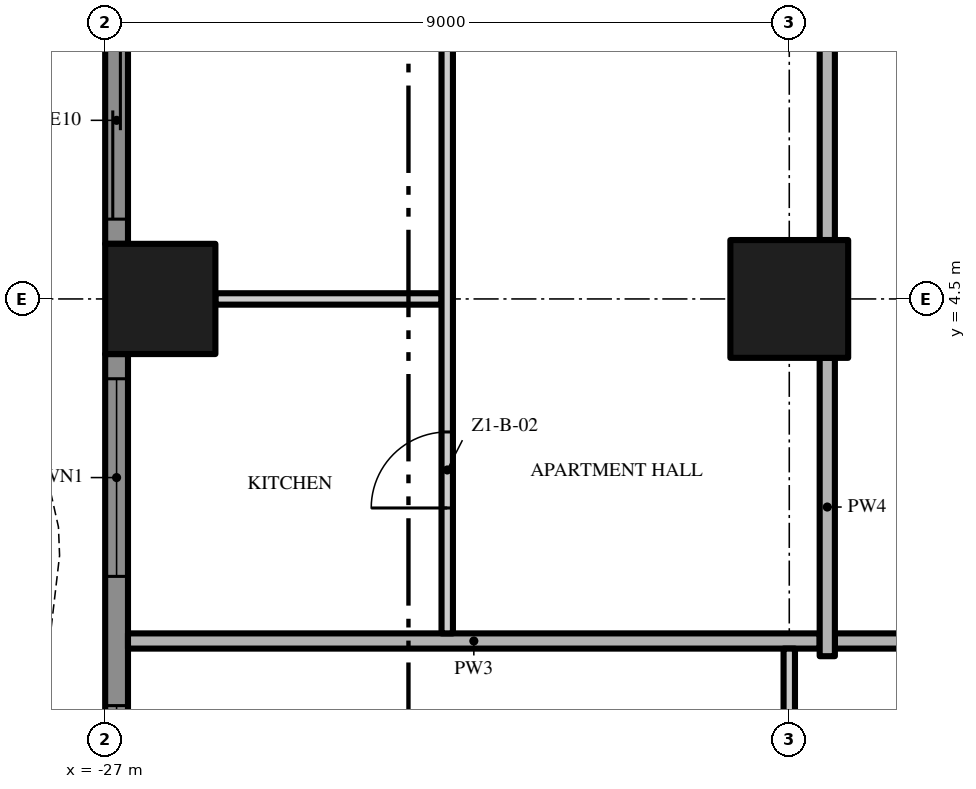
"""IFC4 building model, lengths in metres.
Left out: names, types, materials, properties, quantities, classifications, styles, units other than length and angle.
Written with IfcOpenShell. Run it as: python <this file> out.ifc"""

import sys

from ifc_helpers import new_model, si_unit, direction, frame, frame_2d, origin, origin_2d, place, context, subcontext, project, spatial, polyline, rectangle, outline, extrude, element, fill, save


model = new_model("IFC4")
c1 = context("Model", 3, precision=1e-05, world=origin(), true_north=direction((0.0, 1.0)))
c2 = subcontext(c1, "Body", "Model", "MODEL_VIEW")
j1 = project(units=[si_unit("LENGTHUNIT", "METRE"), si_unit("PLANEANGLEUNIT", "RADIAN")], contexts=[c1])
p1 = place(None, origin())
s1 = spatial("IfcSite", under=j1, at=p1, CompositionType="ELEMENT")
p2 = place(p1, origin())
s2 = spatial("IfcBuilding", under=s1, at=p2, CompositionType="ELEMENT")
p3 = place(p2, frame((0.0, 0.0, 34.0)))
s3 = spatial("IfcBuildingStorey", under=s2, at=p3, CompositionType="ELEMENT", Elevation=34.0)
p4 = place(p3, frame((-18.0, 4.5, 0.0), z_axis=(0.0, 0.0, 1.0), x_axis=(1.0, 0.0, 0.0)))
e1 = element("IfcColumn", 1, at=p4, inside=s3, PredefinedType="COLUMN", context=c2, shape_type="SweptSolid", body=[
    extrude(rectangle(XDim=1.55, YDim=1.55, at=origin_2d()), origin(), (0.0, 0.0, 1.0), 3.5),
])
p5 = place(p3, frame((-26.275, 4.5, 0.0), z_axis=(0.0, 0.0, 1.0), x_axis=(1.0, 0.0, 0.0)))
e2 = element("IfcColumn", 2, at=p5, inside=s3, PredefinedType="COLUMN", context=c2, shape_type="SweptSolid", body=[
    extrude(rectangle(XDim=1.45, YDim=1.45, at=origin_2d()), origin(), (0.0, 0.0, 1.0), 3.5),
])
p6 = place(p3, frame((-26.85, 5.225, 0.0), z_axis=(0.0, 0.0, 1.0), x_axis=(0.0, 1.0, 0.0)))
e3 = element("IfcWall", 3, at=p6, inside=s3, PredefinedType="SOLIDWALL", context=c2, shape_type="SweptSolid", body=[
    extrude(rectangle(XDim=7.55, YDim=0.3, at=frame_2d((3.775, 0.0))), origin(), (0.0, 0.0, 1.0), 3.5),
])
p7 = place(p6, frame((4.625, 0.0, 0.0)))
e4 = element("IfcOpeningElement", 4, at=p7, cuts=e3, PredefinedType="OPENING", context=c2, shape_type="SweptSolid", body=[
    extrude(rectangle(XDim=2.6, YDim=2.4, at=frame_2d((1.3, 1.2))), frame((0.0, 0.16, 0.0), z_axis=(0.0, -1.0, 0.0), x_axis=(1.0, 0.0, 0.0)), (0.0, 0.0, 1.0), 0.32),
])
p8 = place(p6, frame((0.325, 0.0, 0.0)))
e5 = element("IfcOpeningElement", 5, at=p8, cuts=e3, PredefinedType="OPENING", context=c2, shape_type="SweptSolid", body=[
    extrude(rectangle(XDim=2.6, YDim=2.4, at=frame_2d((1.3, 1.2))), frame((0.0, 0.16, 0.0), z_axis=(0.0, -1.0, 0.0), x_axis=(1.0, 0.0, 0.0)), (0.0, 0.0, 1.0), 0.32),
])
p9 = place(p3, frame((-26.85, -3.775, 0.0), z_axis=(0.0, 0.0, 1.0), x_axis=(0.0, 1.0, 0.0)))
e6 = element("IfcWall", 6, at=p9, inside=s3, PredefinedType="SOLIDWALL", context=c2, shape_type="SweptSolid", body=[
    extrude(rectangle(XDim=7.55, YDim=0.3, at=frame_2d((3.775, 0.0))), origin(), (0.0, 0.0, 1.0), 3.5),
])
p10 = place(p9, frame((4.625, 0.0, 0.45)))
e7 = element("IfcOpeningElement", 7, at=p10, cuts=e6, PredefinedType="OPENING", context=c2, shape_type="SweptSolid", body=[
    extrude(rectangle(XDim=2.6, YDim=2.65, at=frame_2d((1.3, 1.325))), frame((0.0, 0.16, 0.0), z_axis=(0.0, -1.0, 0.0), x_axis=(1.0, 0.0, 0.0)), (0.0, 0.0, 1.0), 0.32),
])
p11 = place(p9, frame((0.325, 0.0, 0.45)))
e8 = element("IfcOpeningElement", 8, at=p11, cuts=e6, PredefinedType="OPENING", context=c2, shape_type="SweptSolid", body=[
    extrude(rectangle(XDim=2.6, YDim=2.65, at=frame_2d((1.3, 1.325))), frame((0.0, 0.16, 0.0), z_axis=(0.0, -1.0, 0.0), x_axis=(1.0, 0.0, 0.0)), (0.0, 0.0, 1.0), 0.32),
])
p12 = place(p3, origin())
e9 = element("IfcWall", 9, at=p12, inside=s3, PredefinedType="USERDEFINED", context=c2, shape_type="SweptSolid", body=[
    extrude(outline(polyline([(-27.951, 18.0), (-27.615, 16.5), (-27.6, 16.125), (-27.731, 15.0), (-28.255, 13.5), (-28.988, 12.0), (-29.649, 10.5), (-29.985, 9.0), (-30.0, 8.625), (-29.869, 7.5), (-29.345, 6.0), (-28.612, 4.5), (-27.951, 3.0), (-27.615, 1.5), (-27.6, 1.125), (-27.731, 0.0), (-28.255, -1.5), (-28.988, -3.0), (-29.649, -4.5), (-29.985, -6.0), (-30.0, -6.375), (-29.869, -7.5), (-29.345, -9.0), (-28.612, -10.5), (-27.951, -12.0), (-27.615, -13.5), (-27.6, -13.875), (-27.731, -15.0), (-28.255, -16.5), (-28.988, -18.0), (-28.763, -18.11), (-28.024, -16.596), (-27.486, -15.056), (-27.349, -13.885), (-27.366, -13.467), (-27.713, -11.921), (-28.385, -10.395), (-29.114, -8.904), (-29.624, -7.444), (-29.749, -6.365), (-29.736, -6.033), (-29.41, -4.579), (-28.761, -3.105), (-28.024, -1.596), (-27.486, -0.056), (-27.349, 1.115), (-27.366, 1.533), (-27.713, 3.079), (-28.385, 4.605), (-29.114, 6.096), (-29.624, 7.556), (-29.749, 8.635), (-29.736, 8.967), (-29.41, 10.421), (-28.761, 11.895), (-28.024, 13.404), (-27.486, 14.944), (-27.349, 16.115), (-27.366, 16.533), (-27.708, 18.055), (-27.951, 18.0)])), origin(), (0.0, 0.0, 1.0), 0.9),
])
p13 = place(p3, frame((-17.4, 0.0, 0.0), z_axis=(0.0, 0.0, 1.0), x_axis=(1.0, 0.0, 0.0)))
e10 = element("IfcWall", 10, at=p13, inside=s3, PredefinedType="PARTITIONING", context=c2, shape_type="SweptSolid", body=[
    extrude(rectangle(XDim=12.8, YDim=0.2, at=frame_2d((6.4, 0.0))), origin(), (0.0, 0.0, 1.0), 3.5),
])
p14 = place(p3, frame((-26.7, 0.0, 0.0), z_axis=(0.0, 0.0, 1.0), x_axis=(1.0, 0.0, 0.0)))
e11 = element("IfcWall", 11, at=p14, inside=s3, PredefinedType="PARTITIONING", context=c2, shape_type="SweptSolid", body=[
    extrude(rectangle(XDim=9.1, YDim=0.2, at=frame_2d((4.55, 0.0))), origin(), (0.0, 0.0, 1.0), 3.5),
])
p15 = place(p3, frame((-25.55, 4.5, 0.0), z_axis=(0.0, 0.0, 1.0), x_axis=(1.0, 0.0, 0.0)))
e12 = element("IfcWall", 12, at=p15, inside=s3, PredefinedType="PARTITIONING", context=c2, shape_type="SweptSolid", body=[
    extrude(rectangle(XDim=2.975, YDim=0.15, at=frame_2d((1.488, 0.0))), origin(), (0.0, 0.0, 1.0), 3.5),
])
p16 = place(p3, frame((-22.5, 0.1, 0.0), z_axis=(0.0, 0.0, 1.0), x_axis=(0.0, 1.0, 0.0)))
e13 = element("IfcWall", 13, at=p16, inside=s3, PredefinedType="PARTITIONING", context=c2, shape_type="SweptSolid", body=[
    extrude(rectangle(XDim=17.175, YDim=0.15, at=frame_2d((8.588, 0.0))), origin(), (0.0, 0.0, 1.0), 3.5),
])
p17 = place(p16, frame((1.65, 0.0, 0.0)))
e14 = element("IfcOpeningElement", 14, at=p17, cuts=e13, PredefinedType="OPENING", context=c2, shape_type="SweptSolid", body=[
    extrude(rectangle(XDim=1.0, YDim=2.4, at=frame_2d((0.5, 1.2))), frame((0.0, 0.085, 0.0), z_axis=(0.0, -1.0, 0.0), x_axis=(1.0, 0.0, 0.0)), (0.0, 0.0, 1.0), 0.17),
])
p18 = place(p16, frame((8.0, 0.0, 0.0)))
e15 = element("IfcOpeningElement", 15, at=p18, cuts=e13, PredefinedType="OPENING", context=c2, shape_type="SweptSolid", body=[
    extrude(rectangle(XDim=1.8, YDim=2.4, at=frame_2d((0.9, 1.2))), frame((0.0, 0.085, 0.0), z_axis=(0.0, -1.0, 0.0), x_axis=(1.0, 0.0, 0.0)), (0.0, 0.0, 1.0), 0.17),
])
p19 = place(p16, frame((16.025, 0.0, 0.0)))
e16 = element("IfcOpeningElement", 16, at=p19, cuts=e13, PredefinedType="OPENING", context=c2, shape_type="SweptSolid", body=[
    extrude(rectangle(XDim=1.0, YDim=2.4, at=frame_2d((0.5, 1.2))), frame((0.0, 0.085, 0.0), z_axis=(0.0, -1.0, 0.0), x_axis=(1.0, 0.0, 0.0)), (0.0, 0.0, 1.0), 0.17),
])
p20 = place(p3, frame((-18.0, -3.725, 0.0), z_axis=(0.0, 0.0, 1.0), x_axis=(0.0, 1.0, 0.0)))
e17 = element("IfcWall", 17, at=p20, inside=s3, PredefinedType="PARTITIONING", context=c2, shape_type="SweptSolid", body=[
    extrude(rectangle(XDim=3.625, YDim=0.15, at=frame_2d((1.812, 0.0))), origin(), (0.0, 0.0, 1.0), 3.5),
])
p21 = place(p20, frame((0.75, 0.0, 0.0)))
e18 = element("IfcOpeningElement", 18, at=p21, cuts=e17, PredefinedType="OPENING", context=c2, shape_type="SweptSolid", body=[
    extrude(rectangle(XDim=1.5, YDim=2.4, at=frame_2d((0.75, 1.2))), frame((0.0, 0.085, 0.0), z_axis=(0.0, -1.0, 0.0), x_axis=(1.0, 0.0, 0.0)), (0.0, 0.0, 1.0), 0.17),
])
p22 = place(p3, frame((-17.5, -0.2, 0.0), z_axis=(0.0, 0.0, 1.0), x_axis=(0.0, 1.0, 0.0)))
e19 = element("IfcWall", 19, at=p22, inside=s3, PredefinedType="PARTITIONING", context=c2, shape_type="SweptSolid", body=[
    extrude(rectangle(XDim=3.925, YDim=0.2, at=frame_2d((1.962, 0.0))), origin(), (0.0, 0.0, 1.0), 3.5),
])
p23 = place(p3, frame((-17.5, 5.275, 0.0), z_axis=(0.0, 0.0, 1.0), x_axis=(0.0, 1.0, 0.0)))
e20 = element("IfcWall", 20, at=p23, inside=s3, PredefinedType="PARTITIONING", context=c2, shape_type="SweptSolid", body=[
    extrude(rectangle(XDim=7.45, YDim=0.2, at=frame_2d((3.725, 0.0))), origin(), (0.0, 0.0, 1.0), 3.5),
])
p24 = place(p23, frame((3.125, 0.0, 0.0)))
e21 = element("IfcOpeningElement", 21, at=p24, cuts=e20, PredefinedType="OPENING", context=c2, shape_type="SweptSolid", body=[
    extrude(rectangle(XDim=1.2, YDim=2.4, at=frame_2d((0.6, 1.2))), frame((0.0, 0.11, 0.0), z_axis=(0.0, -1.0, 0.0), x_axis=(1.0, 0.0, 0.0)), (0.0, 0.0, 1.0), 0.22),
])
p25 = place(p8, origin())
e22 = element("IfcDoor", 22, at=p25, inside=s3, OperationType="SINGLE_SWING_LEFT", PredefinedType="DOOR", context=c2, shape_type="SweptSolid", body=[
    extrude(rectangle(XDim=2.6, YDim=2.4, at=frame_2d((1.3, 1.2))), frame((0.0, 0.025, 0.0), z_axis=(0.0, -1.0, 0.0), x_axis=(1.0, 0.0, 0.0)), (0.0, 0.0, 1.0), 0.05),
])
fill(e5, e22)
p26 = place(p10, origin())
e23 = element("IfcWindow", 23, at=p26, inside=s3, PartitioningType="SINGLE_PANEL", PredefinedType="WINDOW", context=c2, shape_type="SweptSolid", body=[
    extrude(rectangle(XDim=2.6, YDim=2.65, at=frame_2d((1.3, 1.325))), frame((0.0, 0.03, 0.0), z_axis=(0.0, -1.0, 0.0), x_axis=(1.0, 0.0, 0.0)), (0.0, 0.0, 1.0), 0.06),
])
fill(e7, e23)
p27 = place(p11, origin())
e24 = element("IfcWindow", 24, at=p27, inside=s3, PartitioningType="SINGLE_PANEL", PredefinedType="WINDOW", context=c2, shape_type="SweptSolid", body=[
    extrude(rectangle(XDim=2.6, YDim=2.65, at=frame_2d((1.3, 1.325))), frame((0.0, 0.03, 0.0), z_axis=(0.0, -1.0, 0.0), x_axis=(1.0, 0.0, 0.0)), (0.0, 0.0, 1.0), 0.06),
])
fill(e8, e24)
p28 = place(p17, origin())
e25 = element("IfcDoor", 25, at=p28, inside=s3, OperationType="SINGLE_SWING_LEFT", PredefinedType="DOOR", context=c2, shape_type="SweptSolid", body=[
    extrude(rectangle(XDim=1.0, YDim=2.4, at=frame_2d((0.5, 1.2))), frame((0.0, 0.025, 0.0), z_axis=(0.0, -1.0, 0.0), x_axis=(1.0, 0.0, 0.0)), (0.0, 0.0, 1.0), 0.05),
])
fill(e14, e25)
save(model, sys.argv[1])
